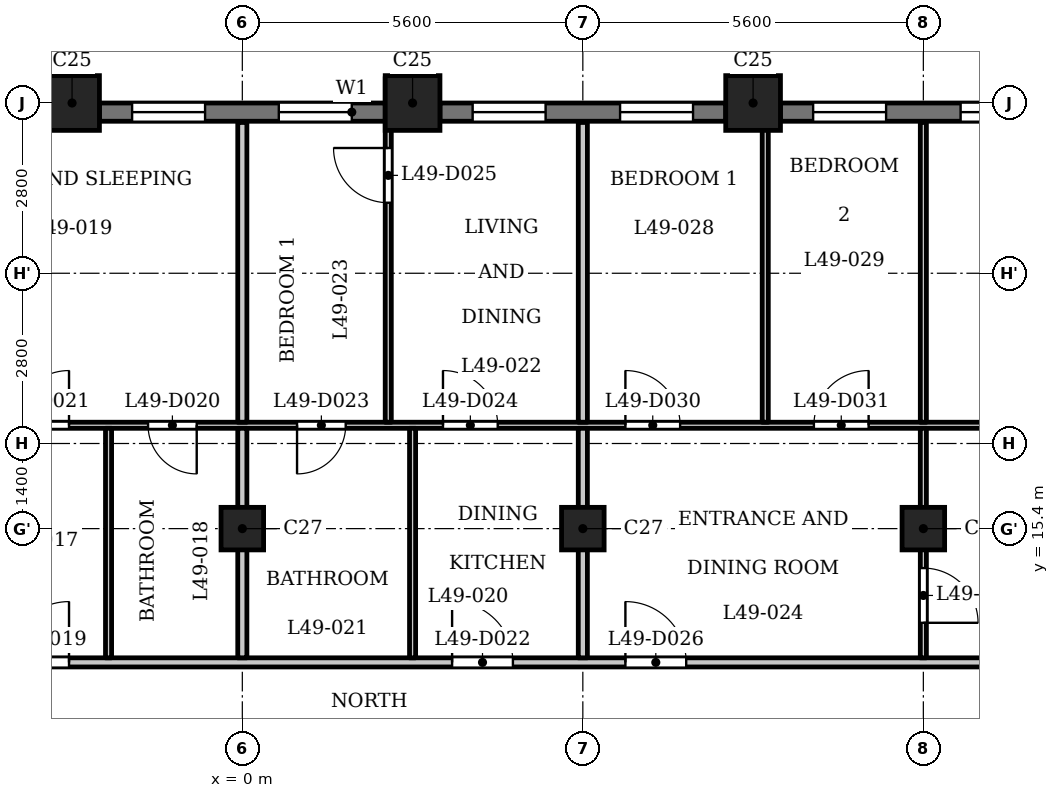
"""IFC4 building model, lengths in metres.
Left out: names, types, materials, properties, quantities, classifications, styles, units other than length and angle.
Written with IfcOpenShell. Run it as: python <this file> out.ifc"""

import sys

from ifc_helpers import new_model, si_unit, direction, frame, frame_2d, origin, origin_2d, place, context, subcontext, project, spatial, rectangle, extrude, element, fill, save


model = new_model("IFC4")
c1 = context("Model", 3, precision=1e-05, world=origin(), true_north=direction((0.0, 1.0)))
c2 = subcontext(c1, "Body", "Model", "MODEL_VIEW")
j1 = project(units=[si_unit("LENGTHUNIT", "METRE"), si_unit("PLANEANGLEUNIT", "RADIAN")], contexts=[c1])
p1 = place(None, origin())
s1 = spatial("IfcSite", under=j1, at=p1, CompositionType="ELEMENT")
p2 = place(p1, origin())
s2 = spatial("IfcBuilding", under=s1, at=p2, CompositionType="ELEMENT")
p3 = place(p2, frame((0.0, 0.0, 192.4)))
s3 = spatial("IfcBuildingStorey", under=s2, at=p3, CompositionType="ELEMENT", Elevation=192.4)
for number, where, z_axis, x_axis in (
    (1, (8.4, 22.4, 0.0), (0.0, 0.0, 1.0), (1.0, 0.0, 0.0)),
    (2, (2.8, 22.4, 0.0), (0.0, 0.0, 1.0), (1.0, 0.0, 0.0)),
    (3, (-2.8, 22.4, 0.0), (0.0, 0.0, 1.0), (1.0, 0.0, 0.0)),
):
    element("IfcColumn", number, at=place(p3, frame(where, z_axis=z_axis, x_axis=x_axis)), inside=s3, PredefinedType="COLUMN", context=c2, shape_type="SweptSolid", body=[
        extrude(rectangle(XDim=0.9, YDim=0.9, at=origin_2d()), origin(), (0.0, 0.0, 1.0), 3.5),
    ])
for number, where, z_axis, x_axis in (
    (4, (0.0, 15.4, 0.0), (0.0, 0.0, 1.0), (1.0, 0.0, 0.0)),
    (5, (5.6, 15.4, 0.0), (0.0, 0.0, 1.0), (1.0, 0.0, 0.0)),
    (6, (11.2, 15.4, 0.0), (0.0, 0.0, 1.0), (1.0, 0.0, 0.0)),
):
    element("IfcColumn", number, at=place(p3, frame(where, z_axis=z_axis, x_axis=x_axis)), inside=s3, PredefinedType="COLUMN", context=c2, shape_type="SweptSolid", body=[
        extrude(rectangle(XDim=0.7, YDim=0.7, at=origin_2d()), origin(), (0.0, 0.0, 1.0), 3.5),
    ])
p4 = place(p3, frame((13.55, 22.25, 0.0), z_axis=(0.0, 0.0, 1.0), x_axis=(-1.0, 0.0, 0.0)))
e7 = element("IfcWall", 7, at=p4, inside=s3, PredefinedType="SOLIDWALL", context=c2, shape_type="SweptSolid", body=[
    extrude(rectangle(XDim=4.7, YDim=0.3, at=frame_2d((2.35, 0.0))), origin(), (0.0, 0.0, 1.0), 2.5),
])
p5 = place(p4, frame((0.538, 0.0, 0.6)))
e8 = element("IfcOpeningElement", 8, at=p5, cuts=e7, PredefinedType="OPENING", context=c2, shape_type="SweptSolid", body=[
    extrude(rectangle(XDim=1.2, YDim=1.55, at=frame_2d((0.6, 0.775))), frame((0.0, 0.16, 0.0), z_axis=(0.0, -1.0, 0.0), x_axis=(1.0, 0.0, 0.0)), (0.0, 0.0, 1.0), 0.32),
])
p6 = place(p4, frame((2.962, 0.0, 0.6)))
e9 = element("IfcOpeningElement", 9, at=p6, cuts=e7, PredefinedType="OPENING", context=c2, shape_type="SweptSolid", body=[
    extrude(rectangle(XDim=1.2, YDim=1.55, at=frame_2d((0.6, 0.775))), frame((0.0, 0.16, 0.0), z_axis=(0.0, -1.0, 0.0), x_axis=(1.0, 0.0, 0.0)), (0.0, 0.0, 1.0), 0.32),
])
p7 = place(p3, frame((7.95, 22.25, 0.0), z_axis=(0.0, 0.0, 1.0), x_axis=(-1.0, 0.0, 0.0)))
e10 = element("IfcWall", 10, at=p7, inside=s3, PredefinedType="SOLIDWALL", context=c2, shape_type="SweptSolid", body=[
    extrude(rectangle(XDim=4.7, YDim=0.3, at=frame_2d((2.35, 0.0))), origin(), (0.0, 0.0, 1.0), 2.5),
])
p8 = place(p7, frame((0.538, 0.0, 0.6)))
e11 = element("IfcOpeningElement", 11, at=p8, cuts=e10, PredefinedType="OPENING", context=c2, shape_type="SweptSolid", body=[
    extrude(rectangle(XDim=1.2, YDim=1.55, at=frame_2d((0.6, 0.775))), frame((0.0, 0.16, 0.0), z_axis=(0.0, -1.0, 0.0), x_axis=(1.0, 0.0, 0.0)), (0.0, 0.0, 1.0), 0.32),
])
p9 = place(p7, frame((2.962, 0.0, 0.6)))
e12 = element("IfcOpeningElement", 12, at=p9, cuts=e10, PredefinedType="OPENING", context=c2, shape_type="SweptSolid", body=[
    extrude(rectangle(XDim=1.2, YDim=1.55, at=frame_2d((0.6, 0.775))), frame((0.0, 0.16, 0.0), z_axis=(0.0, -1.0, 0.0), x_axis=(1.0, 0.0, 0.0)), (0.0, 0.0, 1.0), 0.32),
])
p10 = place(p3, frame((2.35, 22.25, 0.0), z_axis=(0.0, 0.0, 1.0), x_axis=(-1.0, 0.0, 0.0)))
e13 = element("IfcWall", 13, at=p10, inside=s3, PredefinedType="SOLIDWALL", context=c2, shape_type="SweptSolid", body=[
    extrude(rectangle(XDim=4.7, YDim=0.3, at=frame_2d((2.35, 0.0))), origin(), (0.0, 0.0, 1.0), 2.5),
])
p11 = place(p10, frame((0.55, 0.0, 0.6)))
e14 = element("IfcOpeningElement", 14, at=p11, cuts=e13, PredefinedType="OPENING", context=c2, shape_type="SweptSolid", body=[
    extrude(rectangle(XDim=1.2, YDim=1.55, at=frame_2d((0.6, 0.775))), frame((0.0, 0.16, 0.0), z_axis=(0.0, -1.0, 0.0), x_axis=(1.0, 0.0, 0.0)), (0.0, 0.0, 1.0), 0.32),
])
p12 = place(p10, frame((2.962, 0.0, 0.6)))
e15 = element("IfcOpeningElement", 15, at=p12, cuts=e13, PredefinedType="OPENING", context=c2, shape_type="SweptSolid", body=[
    extrude(rectangle(XDim=1.2, YDim=1.55, at=frame_2d((0.6, 0.775))), frame((0.0, 0.16, 0.0), z_axis=(0.0, -1.0, 0.0), x_axis=(1.0, 0.0, 0.0)), (0.0, 0.0, 1.0), 0.32),
])
p13 = place(p3, frame((-17.4, 13.2, 0.0), z_axis=(0.0, 0.0, 1.0), x_axis=(1.0, 0.0, 0.0)))
e16 = element("IfcWall", 16, at=p13, inside=s3, PredefinedType="PARTITIONING", context=c2, shape_type="SweptSolid", body=[
    extrude(rectangle(XDim=34.8, YDim=0.15, at=frame_2d((17.4, 0.0))), origin(), (0.0, 0.0, 1.0), 3.2),
])
p14 = place(p13, frame((0.25, 0.0, 0.0)))
e17 = element("IfcOpeningElement", 17, at=p14, cuts=e16, PredefinedType="OPENING", context=c2, shape_type="SweptSolid", body=[
    extrude(rectangle(XDim=1.0, YDim=2.1, at=frame_2d((0.5, 1.05))), frame((0.0, 0.085, 0.0), z_axis=(0.0, -1.0, 0.0), x_axis=(1.0, 0.0, 0.0)), (0.0, 0.0, 1.0), 0.17),
])
p15 = place(p13, frame((33.65, 0.0, 0.0)))
e18 = element("IfcOpeningElement", 18, at=p15, cuts=e16, PredefinedType="OPENING", context=c2, shape_type="SweptSolid", body=[
    extrude(rectangle(XDim=1.0, YDim=2.1, at=frame_2d((0.5, 1.05))), frame((0.0, 0.085, 0.0), z_axis=(0.0, -1.0, 0.0), x_axis=(1.0, 0.0, 0.0)), (0.0, 0.0, 1.0), 0.17),
])
p16 = place(p13, frame((10.15, 0.0, 0.0)))
e19 = element("IfcOpeningElement", 19, at=p16, cuts=e16, PredefinedType="OPENING", context=c2, shape_type="SweptSolid", body=[
    extrude(rectangle(XDim=1.0, YDim=2.1, at=frame_2d((0.5, 1.05))), frame((0.0, 0.085, 0.0), z_axis=(0.0, -1.0, 0.0), x_axis=(1.0, 0.0, 0.0)), (0.0, 0.0, 1.0), 0.17),
])
p17 = place(p13, frame((13.55, 0.0, 0.0)))
e20 = element("IfcOpeningElement", 20, at=p17, cuts=e16, PredefinedType="OPENING", context=c2, shape_type="SweptSolid", body=[
    extrude(rectangle(XDim=1.0, YDim=2.1, at=frame_2d((0.5, 1.05))), frame((0.0, 0.085, 0.0), z_axis=(0.0, -1.0, 0.0), x_axis=(1.0, 0.0, 0.0)), (0.0, 0.0, 1.0), 0.17),
])
p18 = place(p13, frame((20.85, 0.0, 0.0)))
e21 = element("IfcOpeningElement", 21, at=p18, cuts=e16, PredefinedType="OPENING", context=c2, shape_type="SweptSolid", body=[
    extrude(rectangle(XDim=1.0, YDim=2.1, at=frame_2d((0.5, 1.05))), frame((0.0, 0.085, 0.0), z_axis=(0.0, -1.0, 0.0), x_axis=(1.0, 0.0, 0.0)), (0.0, 0.0, 1.0), 0.17),
])
p19 = place(p13, frame((23.7, 0.0, 0.0)))
e22 = element("IfcOpeningElement", 22, at=p19, cuts=e16, PredefinedType="OPENING", context=c2, shape_type="SweptSolid", body=[
    extrude(rectangle(XDim=1.0, YDim=2.1, at=frame_2d((0.5, 1.05))), frame((0.0, 0.085, 0.0), z_axis=(0.0, -1.0, 0.0), x_axis=(1.0, 0.0, 0.0)), (0.0, 0.0, 1.0), 0.17),
])
p20 = place(p3, frame((-16.725, 17.1, 0.0), z_axis=(0.0, 0.0, 1.0), x_axis=(1.0, 0.0, 0.0)))
e23 = element("IfcWall", 23, at=p20, inside=s3, PredefinedType="PARTITIONING", context=c2, shape_type="SweptSolid", body=[
    extrude(rectangle(XDim=33.45, YDim=0.1, at=frame_2d((16.725, 0.0))), origin(), (0.0, 0.0, 1.0), 3.2),
])
p21 = place(p20, frame((4.075, 0.0, 0.0)))
e24 = element("IfcOpeningElement", 24, at=p21, cuts=e23, PredefinedType="OPENING", context=c2, shape_type="SweptSolid", body=[
    extrude(rectangle(XDim=0.8, YDim=2.1, at=frame_2d((0.4, 1.05))), frame((0.0, 0.06, 0.0), z_axis=(0.0, -1.0, 0.0), x_axis=(1.0, 0.0, 0.0)), (0.0, 0.0, 1.0), 0.12),
])
p22 = place(p20, frame((9.575, 0.0, 0.0)))
e25 = element("IfcOpeningElement", 25, at=p22, cuts=e23, PredefinedType="OPENING", context=c2, shape_type="SweptSolid", body=[
    extrude(rectangle(XDim=0.9, YDim=2.1, at=frame_2d((0.45, 1.05))), frame((0.0, 0.06, 0.0), z_axis=(0.0, -1.0, 0.0), x_axis=(1.0, 0.0, 0.0)), (0.0, 0.0, 1.0), 0.12),
])
p23 = place(p20, frame((15.175, 0.0, 0.0)))
e26 = element("IfcOpeningElement", 26, at=p23, cuts=e23, PredefinedType="OPENING", context=c2, shape_type="SweptSolid", body=[
    extrude(rectangle(XDim=0.8, YDim=2.1, at=frame_2d((0.4, 1.05))), frame((0.0, 0.06, 0.0), z_axis=(0.0, -1.0, 0.0), x_axis=(1.0, 0.0, 0.0)), (0.0, 0.0, 1.0), 0.12),
])
p24 = place(p20, frame((12.975, 0.0, 0.0)))
e27 = element("IfcOpeningElement", 27, at=p24, cuts=e23, PredefinedType="OPENING", context=c2, shape_type="SweptSolid", body=[
    extrude(rectangle(XDim=0.9, YDim=2.1, at=frame_2d((0.45, 1.05))), frame((0.0, 0.06, 0.0), z_axis=(0.0, -1.0, 0.0), x_axis=(1.0, 0.0, 0.0)), (0.0, 0.0, 1.0), 0.12),
])
p25 = place(p20, frame((17.625, 0.0, 0.0)))
e28 = element("IfcOpeningElement", 28, at=p25, cuts=e23, PredefinedType="OPENING", context=c2, shape_type="SweptSolid", body=[
    extrude(rectangle(XDim=0.8, YDim=2.1, at=frame_2d((0.4, 1.05))), frame((0.0, 0.06, 0.0), z_axis=(0.0, -1.0, 0.0), x_axis=(1.0, 0.0, 0.0)), (0.0, 0.0, 1.0), 0.12),
])
p26 = place(p20, frame((20.025, 0.0, 0.0)))
e29 = element("IfcOpeningElement", 29, at=p26, cuts=e23, PredefinedType="OPENING", context=c2, shape_type="SweptSolid", body=[
    extrude(rectangle(XDim=0.9, YDim=2.1, at=frame_2d((0.45, 1.05))), frame((0.0, 0.06, 0.0), z_axis=(0.0, -1.0, 0.0), x_axis=(1.0, 0.0, 0.0)), (0.0, 0.0, 1.0), 0.12),
])
p27 = place(p20, frame((31.975, 0.0, 0.0)))
e30 = element("IfcOpeningElement", 30, at=p27, cuts=e23, PredefinedType="OPENING", context=c2, shape_type="SweptSolid", body=[
    extrude(rectangle(XDim=0.8, YDim=2.1, at=frame_2d((0.4, 1.05))), frame((0.0, 0.06, 0.0), z_axis=(0.0, -1.0, 0.0), x_axis=(1.0, 0.0, 0.0)), (0.0, 0.0, 1.0), 0.12),
])
p28 = place(p20, frame((29.775, 0.0, 0.0)))
e31 = element("IfcOpeningElement", 31, at=p28, cuts=e23, PredefinedType="OPENING", context=c2, shape_type="SweptSolid", body=[
    extrude(rectangle(XDim=0.9, YDim=2.1, at=frame_2d((0.45, 1.05))), frame((0.0, 0.06, 0.0), z_axis=(0.0, -1.0, 0.0), x_axis=(1.0, 0.0, 0.0)), (0.0, 0.0, 1.0), 0.12),
])
p29 = place(p20, frame((23.025, 0.0, 0.0)))
e32 = element("IfcOpeningElement", 32, at=p29, cuts=e23, PredefinedType="OPENING", context=c2, shape_type="SweptSolid", body=[
    extrude(rectangle(XDim=0.9, YDim=2.1, at=frame_2d((0.45, 1.05))), frame((0.0, 0.06, 0.0), z_axis=(0.0, -1.0, 0.0), x_axis=(1.0, 0.0, 0.0)), (0.0, 0.0, 1.0), 0.12),
])
p30 = place(p20, frame((26.125, 0.0, 0.0)))
e33 = element("IfcOpeningElement", 33, at=p30, cuts=e23, PredefinedType="OPENING", context=c2, shape_type="SweptSolid", body=[
    extrude(rectangle(XDim=0.9, YDim=2.1, at=frame_2d((0.45, 1.05))), frame((0.0, 0.06, 0.0), z_axis=(0.0, -1.0, 0.0), x_axis=(1.0, 0.0, 0.0)), (0.0, 0.0, 1.0), 0.12),
])
p31 = place(p3, frame((-2.2, 13.275, 0.0), z_axis=(0.0, 0.0, 1.0), x_axis=(0.0, 1.0, 0.0)))
e34 = element("IfcWall", 34, at=p31, inside=s3, PredefinedType="PARTITIONING", context=c2, shape_type="SweptSolid", body=[
    extrude(rectangle(XDim=3.775, YDim=0.1, at=frame_2d((1.888, 0.0))), origin(), (0.0, 0.0, 1.0), 3.2),
])
p32 = place(p3, frame((0.0, 13.275, 0.0), z_axis=(0.0, 0.0, 1.0), x_axis=(0.0, 1.0, 0.0)))
e35 = element("IfcWall", 35, at=p32, inside=s3, PredefinedType="PARTITIONING", context=c2, shape_type="SweptSolid", body=[
    extrude(rectangle(XDim=3.775, YDim=0.15, at=frame_2d((1.888, 0.0))), origin(), (0.0, 0.0, 1.0), 3.2),
])
p33 = place(p3, frame((0.0, 17.15, 0.0), z_axis=(0.0, 0.0, 1.0), x_axis=(0.0, 1.0, 0.0)))
e36 = element("IfcWall", 36, at=p33, inside=s3, PredefinedType="PARTITIONING", context=c2, shape_type="SweptSolid", body=[
    extrude(rectangle(XDim=4.93, YDim=0.15, at=frame_2d((2.465, 0.0))), origin(), (0.0, 0.0, 1.0), 3.2),
])
p34 = place(p3, frame((2.4, 17.15, 0.0), z_axis=(0.0, 0.0, 1.0), x_axis=(0.0, 1.0, 0.0)))
e37 = element("IfcWall", 37, at=p34, inside=s3, PredefinedType="PARTITIONING", context=c2, shape_type="SweptSolid", body=[
    extrude(rectangle(XDim=5.68, YDim=0.1, at=frame_2d((2.84, 0.0))), origin(), (0.0, 0.0, 1.0), 3.2),
])
p35 = place(p34, frame((3.61, 0.0, 0.0)))
e38 = element("IfcOpeningElement", 38, at=p35, cuts=e37, PredefinedType="OPENING", context=c2, shape_type="SweptSolid", body=[
    extrude(rectangle(XDim=0.9, YDim=2.1, at=frame_2d((0.45, 1.05))), frame((0.0, 0.06, 0.0), z_axis=(0.0, -1.0, 0.0), x_axis=(1.0, 0.0, 0.0)), (0.0, 0.0, 1.0), 0.12),
])
p36 = place(p3, frame((2.8, 13.275, 0.0), z_axis=(0.0, 0.0, 1.0), x_axis=(0.0, 1.0, 0.0)))
e39 = element("IfcWall", 39, at=p36, inside=s3, PredefinedType="PARTITIONING", context=c2, shape_type="SweptSolid", body=[
    extrude(rectangle(XDim=3.775, YDim=0.1, at=frame_2d((1.888, 0.0))), origin(), (0.0, 0.0, 1.0), 3.2),
])
p37 = place(p3, frame((5.6, 13.275, 0.0), z_axis=(0.0, 0.0, 1.0), x_axis=(0.0, 1.0, 0.0)))
e40 = element("IfcWall", 40, at=p37, inside=s3, PredefinedType="PARTITIONING", context=c2, shape_type="SweptSolid", body=[
    extrude(rectangle(XDim=3.775, YDim=0.15, at=frame_2d((1.888, 0.0))), origin(), (0.0, 0.0, 1.0), 3.2),
])
p38 = place(p3, frame((5.6, 17.15, 0.0), z_axis=(0.0, 0.0, 1.0), x_axis=(0.0, 1.0, 0.0)))
e41 = element("IfcWall", 41, at=p38, inside=s3, PredefinedType="PARTITIONING", context=c2, shape_type="SweptSolid", body=[
    extrude(rectangle(XDim=4.93, YDim=0.15, at=frame_2d((2.465, 0.0))), origin(), (0.0, 0.0, 1.0), 3.2),
])
p39 = place(p3, frame((8.6, 17.15, 0.0), z_axis=(0.0, 0.0, 1.0), x_axis=(0.0, 1.0, 0.0)))
e42 = element("IfcWall", 42, at=p39, inside=s3, PredefinedType="PARTITIONING", context=c2, shape_type="SweptSolid", body=[
    extrude(rectangle(XDim=5.68, YDim=0.1, at=frame_2d((2.84, 0.0))), origin(), (0.0, 0.0, 1.0), 3.2),
])
p40 = place(p3, frame((11.2, 13.275, 0.0), z_axis=(0.0, 0.0, 1.0), x_axis=(0.0, 1.0, 0.0)))
e43 = element("IfcWall", 43, at=p40, inside=s3, PredefinedType="PARTITIONING", context=c2, shape_type="SweptSolid", body=[
    extrude(rectangle(XDim=3.775, YDim=0.1, at=frame_2d((1.888, 0.0))), origin(), (0.0, 0.0, 1.0), 3.2),
])
p41 = place(p40, frame((0.576, 0.0, 0.0)))
e44 = element("IfcOpeningElement", 44, at=p41, cuts=e43, PredefinedType="OPENING", context=c2, shape_type="SweptSolid", body=[
    extrude(rectangle(XDim=0.9, YDim=2.1, at=frame_2d((0.45, 1.05))), frame((0.0, 0.06, 0.0), z_axis=(0.0, -1.0, 0.0), x_axis=(1.0, 0.0, 0.0)), (0.0, 0.0, 1.0), 0.12),
])
p42 = place(p3, frame((11.2, 17.15, 0.0), z_axis=(0.0, 0.0, 1.0), x_axis=(0.0, 1.0, 0.0)))
e45 = element("IfcWall", 45, at=p42, inside=s3, PredefinedType="PARTITIONING", context=c2, shape_type="SweptSolid", body=[
    extrude(rectangle(XDim=4.93, YDim=0.1, at=frame_2d((2.465, 0.0))), origin(), (0.0, 0.0, 1.0), 3.2),
])
p43 = place(p17, origin())
e46 = element("IfcDoor", 46, at=p43, inside=s3, OperationType="SINGLE_SWING_LEFT", PredefinedType="DOOR", context=c2, shape_type="SweptSolid", body=[
    extrude(rectangle(XDim=1.0, YDim=2.1, at=frame_2d((0.5, 1.05))), frame((0.0, 0.025, 0.0), z_axis=(0.0, -1.0, 0.0), x_axis=(1.0, 0.0, 0.0)), (0.0, 0.0, 1.0), 0.05),
])
fill(e20, e46)
p44 = place(p23, origin())
e47 = element("IfcDoor", 47, at=p44, inside=s3, OperationType="SINGLE_SWING_RIGHT", PredefinedType="DOOR", context=c2, shape_type="SweptSolid", body=[
    extrude(rectangle(XDim=0.8, YDim=2.1, at=frame_2d((0.4, 1.05))), frame((0.0, 0.025, 0.0), z_axis=(0.0, -1.0, 0.0), x_axis=(1.0, 0.0, 0.0)), (0.0, 0.0, 1.0), 0.05),
])
fill(e26, e47)
p45 = place(p24, origin())
e48 = element("IfcDoor", 48, at=p45, inside=s3, OperationType="SINGLE_SWING_LEFT", PredefinedType="DOOR", context=c2, shape_type="SweptSolid", body=[
    extrude(rectangle(XDim=0.9, YDim=2.1, at=frame_2d((0.45, 1.05))), frame((0.0, 0.025, 0.0), z_axis=(0.0, -1.0, 0.0), x_axis=(1.0, 0.0, 0.0)), (0.0, 0.0, 1.0), 0.05),
])
fill(e27, e48)
p46 = place(p18, origin())
e49 = element("IfcDoor", 49, at=p46, inside=s3, OperationType="SINGLE_SWING_RIGHT", PredefinedType="DOOR", context=c2, shape_type="SweptSolid", body=[
    extrude(rectangle(XDim=1.0, YDim=2.1, at=frame_2d((0.5, 1.05))), frame((0.0, 0.025, 0.0), z_axis=(0.0, -1.0, 0.0), x_axis=(1.0, 0.0, 0.0)), (0.0, 0.0, 1.0), 0.05),
])
fill(e21, e49)
p47 = place(p25, origin())
e50 = element("IfcDoor", 50, at=p47, inside=s3, OperationType="SINGLE_SWING_LEFT", PredefinedType="DOOR", context=c2, shape_type="SweptSolid", body=[
    extrude(rectangle(XDim=0.8, YDim=2.1, at=frame_2d((0.4, 1.05))), frame((0.0, 0.025, 0.0), z_axis=(0.0, -1.0, 0.0), x_axis=(1.0, 0.0, 0.0)), (0.0, 0.0, 1.0), 0.05),
])
fill(e28, e50)
p48 = place(p26, origin())
e51 = element("IfcDoor", 51, at=p48, inside=s3, OperationType="SINGLE_SWING_RIGHT", PredefinedType="DOOR", context=c2, shape_type="SweptSolid", body=[
    extrude(rectangle(XDim=0.9, YDim=2.1, at=frame_2d((0.45, 1.05))), frame((0.0, 0.025, 0.0), z_axis=(0.0, -1.0, 0.0), x_axis=(1.0, 0.0, 0.0)), (0.0, 0.0, 1.0), 0.05),
])
fill(e29, e51)
p49 = place(p35, origin())
e52 = element("IfcDoor", 52, at=p49, inside=s3, OperationType="SINGLE_SWING_LEFT", PredefinedType="DOOR", context=c2, shape_type="SweptSolid", body=[
    extrude(rectangle(XDim=0.9, YDim=2.1, at=frame_2d((0.45, 1.05))), frame((0.0, 0.025, 0.0), z_axis=(0.0, -1.0, 0.0), x_axis=(1.0, 0.0, 0.0)), (0.0, 0.0, 1.0), 0.05),
])
fill(e38, e52)
p50 = place(p19, origin())
e53 = element("IfcDoor", 53, at=p50, inside=s3, OperationType="SINGLE_SWING_RIGHT", PredefinedType="DOOR", context=c2, shape_type="SweptSolid", body=[
    extrude(rectangle(XDim=1.0, YDim=2.1, at=frame_2d((0.5, 1.05))), frame((0.0, 0.025, 0.0), z_axis=(0.0, -1.0, 0.0), x_axis=(1.0, 0.0, 0.0)), (0.0, 0.0, 1.0), 0.05),
])
fill(e22, e53)
p51 = place(p41, origin())
e54 = element("IfcDoor", 54, at=p51, inside=s3, OperationType="SINGLE_SWING_LEFT", PredefinedType="DOOR", context=c2, shape_type="SweptSolid", body=[
    extrude(rectangle(XDim=0.9, YDim=2.1, at=frame_2d((0.45, 1.05))), frame((0.0, 0.025, 0.0), z_axis=(0.0, -1.0, 0.0), x_axis=(1.0, 0.0, 0.0)), (0.0, 0.0, 1.0), 0.05),
])
fill(e44, e54)
p52 = place(p29, origin())
e55 = element("IfcDoor", 55, at=p52, inside=s3, OperationType="SINGLE_SWING_RIGHT", PredefinedType="DOOR", context=c2, shape_type="SweptSolid", body=[
    extrude(rectangle(XDim=0.9, YDim=2.1, at=frame_2d((0.45, 1.05))), frame((0.0, 0.025, 0.0), z_axis=(0.0, -1.0, 0.0), x_axis=(1.0, 0.0, 0.0)), (0.0, 0.0, 1.0), 0.05),
])
fill(e32, e55)
p53 = place(p30, origin())
e56 = element("IfcDoor", 56, at=p53, inside=s3, OperationType="SINGLE_SWING_LEFT", PredefinedType="DOOR", context=c2, shape_type="SweptSolid", body=[
    extrude(rectangle(XDim=0.9, YDim=2.1, at=frame_2d((0.45, 1.05))), frame((0.0, 0.025, 0.0), z_axis=(0.0, -1.0, 0.0), x_axis=(1.0, 0.0, 0.0)), (0.0, 0.0, 1.0), 0.05),
])
fill(e33, e56)
p54 = place(p5, origin())
e57 = element("IfcWindow", 57, at=p54, inside=s3, PartitioningType="SINGLE_PANEL", PredefinedType="WINDOW", context=c2, shape_type="SweptSolid", body=[
    extrude(rectangle(XDim=1.2, YDim=1.55, at=frame_2d((0.6, 0.775))), frame((0.0, 0.03, 0.0), z_axis=(0.0, -1.0, 0.0), x_axis=(1.0, 0.0, 0.0)), (0.0, 0.0, 1.0), 0.06),
])
fill(e8, e57)
p55 = place(p6, origin())
e58 = element("IfcWindow", 58, at=p55, inside=s3, PartitioningType="SINGLE_PANEL", PredefinedType="WINDOW", context=c2, shape_type="SweptSolid", body=[
    extrude(rectangle(XDim=1.2, YDim=1.55, at=frame_2d((0.6, 0.775))), frame((0.0, 0.03, 0.0), z_axis=(0.0, -1.0, 0.0), x_axis=(1.0, 0.0, 0.0)), (0.0, 0.0, 1.0), 0.06),
])
fill(e9, e58)
p56 = place(p8, origin())
e59 = element("IfcWindow", 59, at=p56, inside=s3, PartitioningType="SINGLE_PANEL", PredefinedType="WINDOW", context=c2, shape_type="SweptSolid", body=[
    extrude(rectangle(XDim=1.2, YDim=1.55, at=frame_2d((0.6, 0.775))), frame((0.0, 0.03, 0.0), z_axis=(0.0, -1.0, 0.0), x_axis=(1.0, 0.0, 0.0)), (0.0, 0.0, 1.0), 0.06),
])
fill(e11, e59)
p57 = place(p9, origin())
e60 = element("IfcWindow", 60, at=p57, inside=s3, PartitioningType="SINGLE_PANEL", PredefinedType="WINDOW", context=c2, shape_type="SweptSolid", body=[
    extrude(rectangle(XDim=1.2, YDim=1.55, at=frame_2d((0.6, 0.775))), frame((0.0, 0.03, 0.0), z_axis=(0.0, -1.0, 0.0), x_axis=(1.0, 0.0, 0.0)), (0.0, 0.0, 1.0), 0.06),
])
fill(e12, e60)
p58 = place(p11, origin())
e61 = element("IfcWindow", 61, at=p58, inside=s3, PartitioningType="SINGLE_PANEL", PredefinedType="WINDOW", context=c2, shape_type="SweptSolid", body=[
    extrude(rectangle(XDim=1.2, YDim=1.55, at=frame_2d((0.6, 0.775))), frame((0.0, 0.03, 0.0), z_axis=(0.0, -1.0, 0.0), x_axis=(1.0, 0.0, 0.0)), (0.0, 0.0, 1.0), 0.06),
])
fill(e14, e61)
p59 = place(p12, origin())
e62 = element("IfcWindow", 62, at=p59, inside=s3, PartitioningType="SINGLE_PANEL", PredefinedType="WINDOW", context=c2, shape_type="SweptSolid", body=[
    extrude(rectangle(XDim=1.2, YDim=1.55, at=frame_2d((0.6, 0.775))), frame((0.0, 0.03, 0.0), z_axis=(0.0, -1.0, 0.0), x_axis=(1.0, 0.0, 0.0)), (0.0, 0.0, 1.0), 0.06),
])
fill(e15, e62)
save(model, sys.argv[1])
